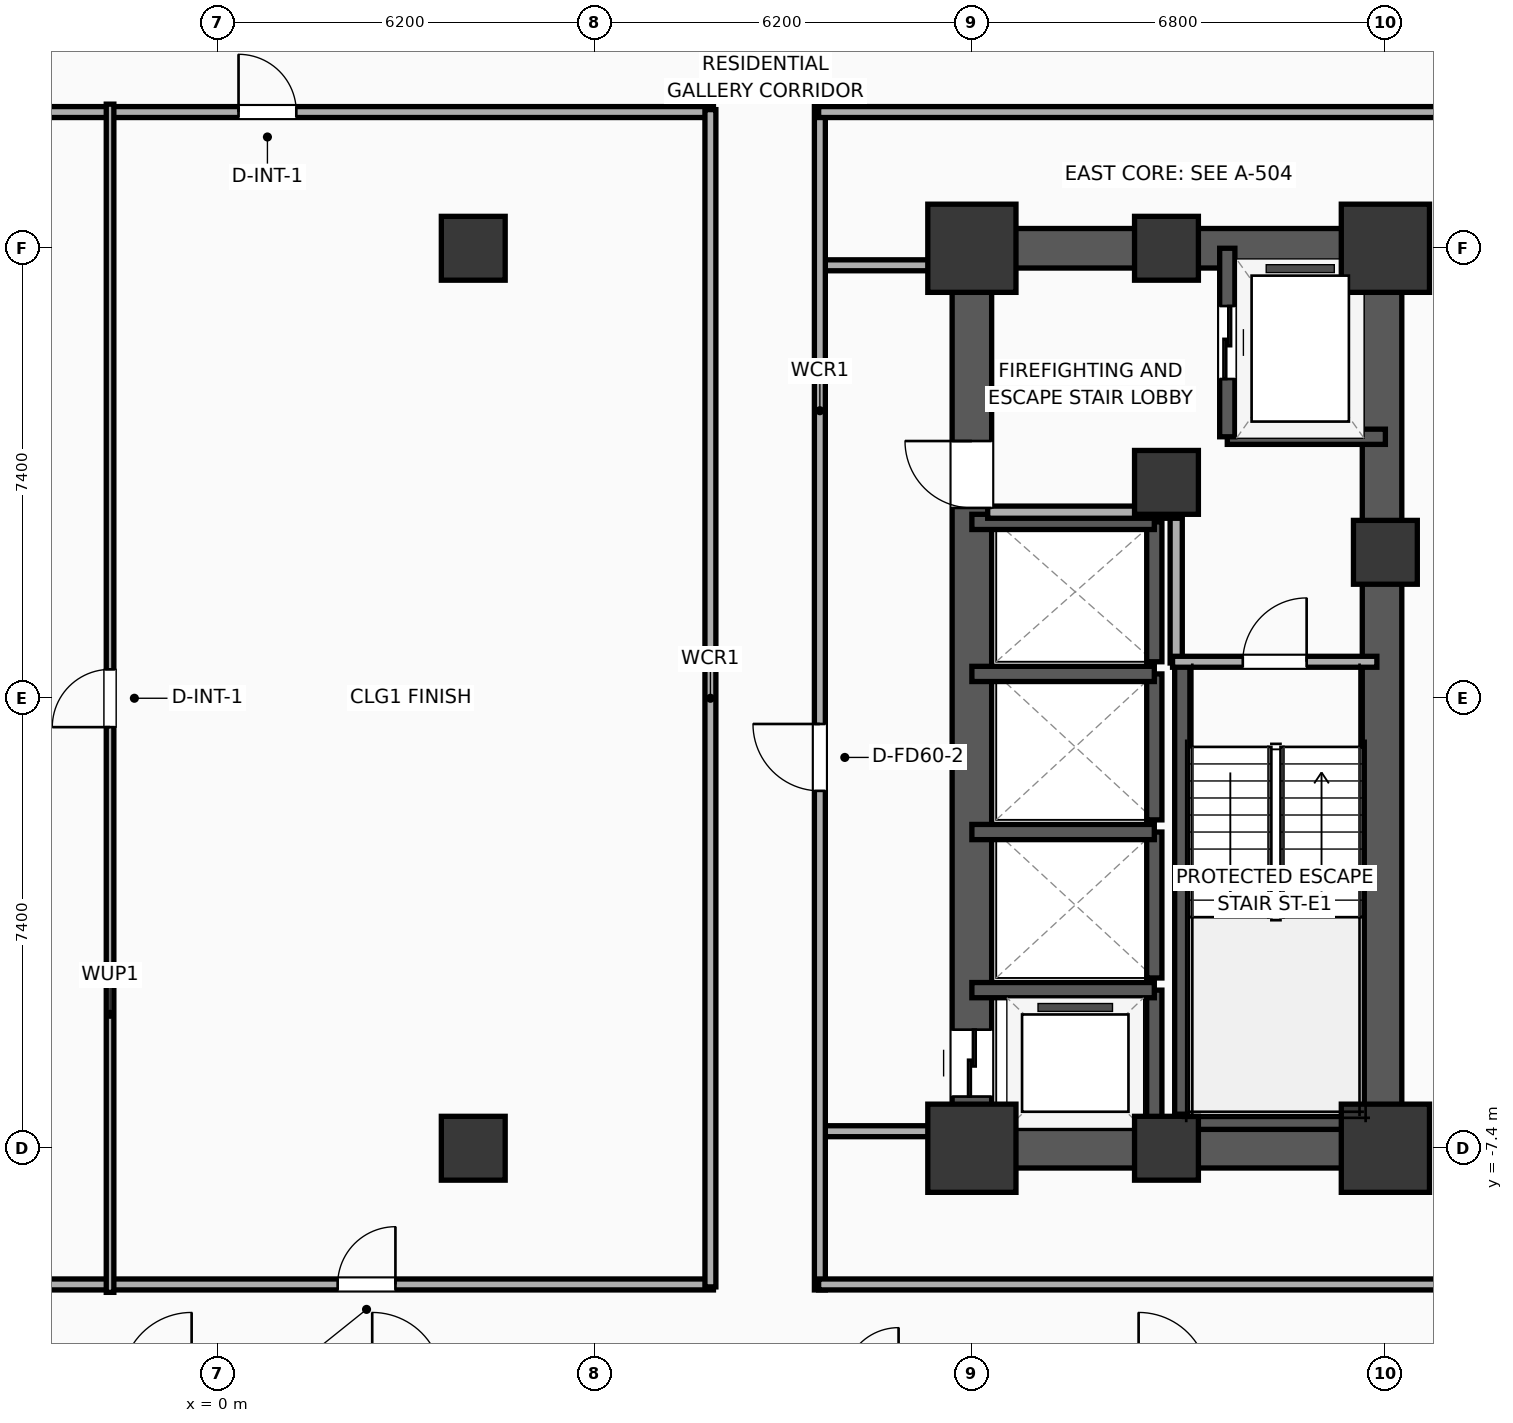
"""IFC4 building model, lengths in metres.
Left out: names, types, materials, properties, quantities, classifications, styles, units other than length and angle.
Written with IfcOpenShell. Run it as: python <this file> out.ifc"""

import sys

from ifc_helpers import new_model, si_unit, direction, frame, frame_2d, origin, origin_2d, place, context, subcontext, project, spatial, rectangle, extrude, element, fill, save


model = new_model("IFC4")
c1 = context("Model", 3, precision=1e-05, world=origin(), true_north=direction((0.0, 1.0)))
c2 = subcontext(c1, "Body", "Model", "MODEL_VIEW")
j1 = project(units=[si_unit("LENGTHUNIT", "METRE"), si_unit("PLANEANGLEUNIT", "RADIAN")], contexts=[c1])
p1 = place(None, origin())
s1 = spatial("IfcSite", under=j1, at=p1, CompositionType="ELEMENT")
p2 = place(p1, origin())
s2 = spatial("IfcBuilding", under=s1, at=p2, CompositionType="ELEMENT")
p3 = place(p2, frame((0.0, 0.0, 76.7)))
s3 = spatial("IfcBuildingStorey", under=s2, at=p3, CompositionType="ELEMENT", Elevation=76.7)
p4 = place(p3, frame((12.4, -7.4, 0.0), z_axis=(0.0, 0.0, 1.0), x_axis=(1.0, 0.0, 0.0)))
e1 = element("IfcColumn", 1, at=p4, inside=s3, PredefinedType="COLUMN", context=c2, shape_type="SweptSolid", body=[
    extrude(rectangle(XDim=1.45, YDim=1.45, at=origin_2d()), origin(), (0.0, 0.0, 1.0), 3.9),
])
p5 = place(p3, frame((15.6, 3.55, 0.0), z_axis=(0.0, 0.0, 1.0), x_axis=(1.0, 0.0, 0.0)))
e2 = element("IfcColumn", 2, at=p5, inside=s3, PredefinedType="COLUMN", context=c2, shape_type="SweptSolid", body=[
    extrude(rectangle(XDim=1.05, YDim=1.05, at=origin_2d()), origin(), (0.0, 0.0, 1.0), 3.9),
])
p6 = place(p3, frame((12.4, 7.4, 0.0), z_axis=(0.0, 0.0, 1.0), x_axis=(1.0, 0.0, 0.0)))
e3 = element("IfcColumn", 3, at=p6, inside=s3, PredefinedType="COLUMN", context=c2, shape_type="SweptSolid", body=[
    extrude(rectangle(XDim=1.45, YDim=1.45, at=origin_2d()), origin(), (0.0, 0.0, 1.0), 3.9),
])
for number, where, z_axis, x_axis in (
    (4, (15.6, -7.4, 0.0), (0.0, 0.0, 1.0), (1.0, 0.0, 0.0)),
    (5, (15.6, 7.4, 0.0), (0.0, 0.0, 1.0), (1.0, 0.0, 0.0)),
):
    element("IfcColumn", number, at=place(p3, frame(where, z_axis=z_axis, x_axis=x_axis)), inside=s3, PredefinedType="COLUMN", context=c2, shape_type="SweptSolid", body=[
        extrude(rectangle(XDim=1.05, YDim=1.05, at=origin_2d()), origin(), (0.0, 0.0, 1.0), 3.9),
    ])
p7 = place(p3, frame((19.2, -7.4, 0.0), z_axis=(0.0, 0.0, 1.0), x_axis=(1.0, 0.0, 0.0)))
e6 = element("IfcColumn", 6, at=p7, inside=s3, PredefinedType="COLUMN", context=c2, shape_type="SweptSolid", body=[
    extrude(rectangle(XDim=1.45, YDim=1.45, at=origin_2d()), origin(), (0.0, 0.0, 1.0), 3.9),
])
p8 = place(p3, frame((19.2, 2.4, 0.0), z_axis=(0.0, 0.0, 1.0), x_axis=(1.0, 0.0, 0.0)))
e7 = element("IfcColumn", 7, at=p8, inside=s3, PredefinedType="COLUMN", context=c2, shape_type="SweptSolid", body=[
    extrude(rectangle(XDim=1.05, YDim=1.05, at=origin_2d()), origin(), (0.0, 0.0, 1.0), 3.9),
])
p9 = place(p3, frame((19.2, 7.4, 0.0), z_axis=(0.0, 0.0, 1.0), x_axis=(1.0, 0.0, 0.0)))
e8 = element("IfcColumn", 8, at=p9, inside=s3, PredefinedType="COLUMN", context=c2, shape_type="SweptSolid", body=[
    extrude(rectangle(XDim=1.45, YDim=1.45, at=origin_2d()), origin(), (0.0, 0.0, 1.0), 3.9),
])
for number, where, z_axis, x_axis in (
    (9, (12.075, -7.4, 0.0), (0.0, 0.0, 1.0), (1.0, 0.0, 0.0)),
    (10, (12.075, 7.4, 0.0), (0.0, 0.0, 1.0), (1.0, 0.0, 0.0)),
):
    element("IfcWall", number, at=place(p3, frame(where, z_axis=z_axis, x_axis=x_axis)), inside=s3, PredefinedType="SHEAR", context=c2, shape_type="SweptSolid", body=[
        extrude(rectangle(XDim=7.45, YDim=0.65, at=frame_2d((3.725, 0.0))), origin(), (0.0, 0.0, 1.0), 3.6),
    ])
p10 = place(p3, frame((12.4, -7.4, 0.0), z_axis=(0.0, 0.0, 1.0), x_axis=(0.0, 1.0, 0.0)))
e11 = element("IfcWall", 11, at=p10, inside=s3, PredefinedType="SHEAR", context=c2, shape_type="SweptSolid", body=[
    extrude(rectangle(XDim=14.8, YDim=0.65, at=frame_2d((7.4, 0.0))), origin(), (0.0, 0.0, 1.0), 3.6),
])
p11 = place(p10, frame((0.85, 0.0, 0.0)))
e12 = element("IfcOpeningElement", 12, at=p11, cuts=e11, PredefinedType="OPENING", context=c2, shape_type="SweptSolid", body=[
    extrude(rectangle(XDim=1.1, YDim=2.05, at=frame_2d((0.55, 1.025))), frame((0.0, 0.335, 0.0), z_axis=(0.0, -1.0, 0.0), x_axis=(1.0, 0.0, 0.0)), (0.0, 0.0, 1.0), 0.67),
])
p12 = place(p10, frame((10.53, 0.0, 0.0)))
e13 = element("IfcOpeningElement", 13, at=p12, cuts=e11, PredefinedType="OPENING", context=c2, shape_type="SweptSolid", body=[
    extrude(rectangle(XDim=1.1, YDim=2.05, at=frame_2d((0.55, 1.025))), frame((0.0, 0.335, 0.0), z_axis=(0.0, -1.0, 0.0), x_axis=(1.0, 0.0, 0.0)), (0.0, 0.0, 1.0), 0.67),
])
p13 = place(p3, frame((19.145, -7.4, 0.0), z_axis=(0.0, 0.0, 1.0), x_axis=(0.0, 1.0, 0.0)))
e14 = element("IfcWall", 14, at=p13, inside=s3, PredefinedType="SHEAR", context=c2, shape_type="SweptSolid", body=[
    extrude(rectangle(XDim=14.8, YDim=0.65, at=frame_2d((7.4, 0.0))), origin(), (0.0, 0.0, 1.0), 3.6),
])
p14 = place(p3, frame((15.86, -7.085, 0.0), z_axis=(0.0, 0.0, 1.0), x_axis=(0.0, 1.0, 0.0)))
e15 = element("IfcWall", 15, at=p14, inside=s3, PredefinedType="SOLIDWALL", context=c2, shape_type="SweptSolid", body=[
    extrude(rectangle(XDim=7.685, YDim=0.25, at=frame_2d((3.843, 0.0))), origin(), (0.0, 0.0, 1.0), 3.6),
])
p15 = place(p3, frame((15.74, -6.965, 0.0), z_axis=(0.0, 0.0, 1.0), x_axis=(1.0, 0.0, 0.0)))
e16 = element("IfcWall", 16, at=p15, inside=s3, PredefinedType="SOLIDWALL", context=c2, shape_type="SweptSolid", body=[
    extrude(rectangle(XDim=3.46, YDim=0.25, at=frame_2d((1.73, 0.0))), origin(), (0.0, 0.0, 1.0), 3.6),
])
for number, where, z_axis, x_axis in (
    (17, (4.2, -7.4, 0.0), (0.0, 0.0, 1.0), (1.0, 0.0, 0.0)),
    (18, (4.2, 7.4, 0.0), (0.0, 0.0, 1.0), (1.0, 0.0, 0.0)),
):
    element("IfcColumn", number, at=place(p3, frame(where, z_axis=z_axis, x_axis=x_axis)), inside=s3, PredefinedType="COLUMN", context=c2, shape_type="SweptSolid", body=[
        extrude(rectangle(XDim=1.05, YDim=1.05, at=origin_2d()), origin(), (0.0, 0.0, 1.0), 3.9),
    ])
p16 = place(p3, frame((16.6, 4.3, 0.0), z_axis=(0.0, 0.0, 1.0), x_axis=(1.0, 0.0, 0.0)))
e19 = element("IfcWall", 19, at=p16, inside=s3, PredefinedType="SOLIDWALL", context=c2, shape_type="SweptSolid", body=[
    extrude(rectangle(XDim=2.6, YDim=0.25, at=frame_2d((1.3, 0.0))), origin(), (0.0, 0.0, 1.0), 3.6),
])
p17 = place(p3, frame((16.6, 7.4, 0.0), z_axis=(0.0, 0.0, 1.0), x_axis=(0.0, -1.0, 0.0)))
e20 = element("IfcWall", 20, at=p17, inside=s3, PredefinedType="SOLIDWALL", context=c2, shape_type="SweptSolid", body=[
    extrude(rectangle(XDim=3.1, YDim=0.25, at=frame_2d((1.55, 0.0))), origin(), (0.0, 0.0, 1.0), 3.6),
])
p18 = place(p17, frame((0.95, 0.0, 0.0)))
e21 = element("IfcOpeningElement", 21, at=p18, cuts=e20, PredefinedType="OPENING", context=c2, shape_type="SweptSolid", body=[
    extrude(rectangle(XDim=1.2, YDim=2.05, at=frame_2d((0.6, 1.025))), frame((0.0, 0.135, 0.0), z_axis=(0.0, -1.0, 0.0), x_axis=(1.0, 0.0, 0.0)), (0.0, 0.0, 1.0), 0.27),
])
p19 = place(p3, frame((15.4, -7.4, 0.0), z_axis=(0.0, 0.0, 1.0), x_axis=(0.0, 1.0, 0.0)))
e22 = element("IfcWall", 22, at=p19, inside=s3, PredefinedType="SOLIDWALL", context=c2, shape_type="SweptSolid", body=[
    extrude(rectangle(XDim=2.6, YDim=0.25, at=frame_2d((1.3, 0.0))), origin(), (0.0, 0.0, 1.0), 3.6),
])
p20 = place(p3, frame((15.4, -4.8, 0.0), z_axis=(0.0, 0.0, 1.0), x_axis=(-1.0, 0.0, 0.0)))
e23 = element("IfcWall", 23, at=p20, inside=s3, PredefinedType="SOLIDWALL", context=c2, shape_type="SweptSolid", body=[
    extrude(rectangle(XDim=3.0, YDim=0.25, at=frame_2d((1.5, 0.0))), origin(), (0.0, 0.0, 1.0), 3.6),
])
p21 = place(p3, frame((15.4, -4.6, 0.0), z_axis=(0.0, 0.0, 1.0), x_axis=(0.0, 1.0, 0.0)))
e24 = element("IfcWall", 24, at=p21, inside=s3, PredefinedType="SOLIDWALL", context=c2, shape_type="SweptSolid", body=[
    extrude(rectangle(XDim=2.4, YDim=0.25, at=frame_2d((1.2, 0.0))), origin(), (0.0, 0.0, 1.0), 3.6),
])
p22 = place(p3, frame((15.4, -2.2, 0.0), z_axis=(0.0, 0.0, 1.0), x_axis=(-1.0, 0.0, 0.0)))
e25 = element("IfcWall", 25, at=p22, inside=s3, PredefinedType="SOLIDWALL", context=c2, shape_type="SweptSolid", body=[
    extrude(rectangle(XDim=3.0, YDim=0.25, at=frame_2d((1.5, 0.0))), origin(), (0.0, 0.0, 1.0), 3.6),
])
p23 = place(p3, frame((15.4, -2.0, 0.0), z_axis=(0.0, 0.0, 1.0), x_axis=(0.0, 1.0, 0.0)))
e26 = element("IfcWall", 26, at=p23, inside=s3, PredefinedType="SOLIDWALL", context=c2, shape_type="SweptSolid", body=[
    extrude(rectangle(XDim=2.4, YDim=0.25, at=frame_2d((1.2, 0.0))), origin(), (0.0, 0.0, 1.0), 3.6),
])
p24 = place(p3, frame((15.4, 0.4, 0.0), z_axis=(0.0, 0.0, 1.0), x_axis=(-1.0, 0.0, 0.0)))
e27 = element("IfcWall", 27, at=p24, inside=s3, PredefinedType="SOLIDWALL", context=c2, shape_type="SweptSolid", body=[
    extrude(rectangle(XDim=3.0, YDim=0.25, at=frame_2d((1.5, 0.0))), origin(), (0.0, 0.0, 1.0), 3.6),
])
p25 = place(p3, frame((15.4, 0.6, 0.0), z_axis=(0.0, 0.0, 1.0), x_axis=(0.0, 1.0, 0.0)))
e28 = element("IfcWall", 28, at=p25, inside=s3, PredefinedType="SOLIDWALL", context=c2, shape_type="SweptSolid", body=[
    extrude(rectangle(XDim=2.3, YDim=0.25, at=frame_2d((1.15, 0.0))), origin(), (0.0, 0.0, 1.0), 3.6),
])
p26 = place(p3, frame((15.4, 2.9, 0.0), z_axis=(0.0, 0.0, 1.0), x_axis=(-1.0, 0.0, 0.0)))
e29 = element("IfcWall", 29, at=p26, inside=s3, PredefinedType="SOLIDWALL", context=c2, shape_type="SweptSolid", body=[
    extrude(rectangle(XDim=3.0, YDim=0.25, at=frame_2d((1.5, 0.0))), origin(), (0.0, 0.0, 1.0), 3.6),
])
p27 = place(p3, frame((15.76, 0.58, 0.0), z_axis=(0.0, 0.0, 1.0), x_axis=(0.0, 1.0, 0.0)))
e30 = element("IfcWall", 30, at=p27, inside=s3, PredefinedType="PARTITIONING", context=c2, shape_type="SweptSolid", body=[
    extrude(rectangle(XDim=2.52, YDim=0.2, at=frame_2d((1.26, 0.0))), origin(), (0.0, 0.0, 1.0), 3.6),
])
p28 = place(p3, frame((12.66, 3.06, 0.0), z_axis=(0.0, 0.0, 1.0), x_axis=(1.0, 0.0, 0.0)))
e31 = element("IfcWall", 31, at=p28, inside=s3, PredefinedType="PARTITIONING", context=c2, shape_type="SweptSolid", body=[
    extrude(rectangle(XDim=3.16, YDim=0.2, at=frame_2d((1.58, 0.0))), origin(), (0.0, 0.0, 1.0), 3.6),
])
p29 = place(p3, frame((15.7, 0.6, 0.0), z_axis=(0.0, 0.0, 1.0), x_axis=(1.0, 0.0, 0.0)))
e32 = element("IfcWall", 32, at=p29, inside=s3, PredefinedType="PARTITIONING", context=c2, shape_type="SweptSolid", body=[
    extrude(rectangle(XDim=3.36, YDim=0.18, at=frame_2d((1.68, 0.0))), origin(), (0.0, 0.0, 1.0), 3.6),
])
p30 = place(p29, frame((1.155, 0.0, 0.0)))
e33 = element("IfcOpeningElement", 33, at=p30, cuts=e32, PredefinedType="OPENING", context=c2, shape_type="SweptSolid", body=[
    extrude(rectangle(XDim=1.05, YDim=2.05, at=frame_2d((0.525, 1.025))), frame((0.0, 0.1, 0.0), z_axis=(0.0, -1.0, 0.0), x_axis=(1.0, 0.0, 0.0)), (0.0, 0.0, 1.0), 0.2),
])
for number, where, z_axis, x_axis in (
    (34, (9.88, 7.12, 0.0), (0.0, 0.0, 1.0), (1.0, 0.0, 0.0)),
    (35, (9.88, -7.12, 0.0), (0.0, 0.0, 1.0), (1.0, 0.0, 0.0)),
):
    element("IfcWall", number, at=place(p3, frame(where, z_axis=z_axis, x_axis=x_axis)), inside=s3, PredefinedType="PARTITIONING", context=c2, shape_type="SweptSolid", body=[
        extrude(rectangle(XDim=2.27, YDim=0.18, at=frame_2d((1.135, 0.0))), origin(), (0.0, 0.0, 1.0), 2.89),
    ])
p31 = place(p3, frame((9.9, -9.73, 0.0), z_axis=(0.0, 0.0, 1.0), x_axis=(0.0, 1.0, 0.0)))
e36 = element("IfcWall", 36, at=p31, inside=s3, PredefinedType="PARTITIONING", context=c2, shape_type="SweptSolid", body=[
    extrude(rectangle(XDim=19.46, YDim=0.18, at=frame_2d((9.73, 0.0))), origin(), (0.0, 0.0, 1.0), 3.6),
])
p32 = place(p31, frame((8.207, 0.0, 0.0)))
e37 = element("IfcOpeningElement", 37, at=p32, cuts=e36, PredefinedType="OPENING", context=c2, shape_type="SweptSolid", body=[
    extrude(rectangle(XDim=1.1, YDim=2.05, at=frame_2d((0.55, 1.025))), frame((0.0, 0.1, 0.0), z_axis=(0.0, -1.0, 0.0), x_axis=(1.0, 0.0, 0.0)), (0.0, 0.0, 1.0), 0.2),
])
p33 = place(p3, frame((9.88, 9.64, 0.0), z_axis=(0.0, 0.0, 1.0), x_axis=(1.0, 0.0, 0.0)))
e38 = element("IfcWall", 38, at=p33, inside=s3, PredefinedType="PARTITIONING", context=c2, shape_type="SweptSolid", body=[
    extrude(rectangle(XDim=16.33, YDim=0.18, at=frame_2d((8.165, 0.0))), origin(), (0.0, 0.0, 1.0), 3.6),
])
p34 = place(p33, frame((14.415, 0.0, 0.0)))
e39 = element("IfcOpeningElement", 39, at=p34, cuts=e38, PredefinedType="OPENING", context=c2, shape_type="SweptSolid", body=[
    extrude(rectangle(XDim=0.9, YDim=2.05, at=frame_2d((0.45, 1.025))), frame((0.0, 0.1, 0.0), z_axis=(0.0, -1.0, 0.0), x_axis=(1.0, 0.0, 0.0)), (0.0, 0.0, 1.0), 0.2),
])
p35 = place(p3, frame((9.88, -9.64, 0.0), z_axis=(0.0, 0.0, 1.0), x_axis=(1.0, 0.0, 0.0)))
e40 = element("IfcWall", 40, at=p35, inside=s3, PredefinedType="PARTITIONING", context=c2, shape_type="SweptSolid", body=[
    extrude(rectangle(XDim=16.33, YDim=0.18, at=frame_2d((8.165, 0.0))), origin(), (0.0, 0.0, 1.0), 3.6),
])
p36 = place(p3, frame((-8.15, 9.64, 0.0), z_axis=(0.0, 0.0, 1.0), x_axis=(1.0, 0.0, 0.0)))
e41 = element("IfcWall", 41, at=p36, inside=s3, PredefinedType="PARTITIONING", context=c2, shape_type="SweptSolid", body=[
    extrude(rectangle(XDim=16.3, YDim=0.18, at=frame_2d((8.15, 0.0))), origin(), (0.0, 0.0, 1.0), 3.6),
])
p37 = place(p36, frame((8.49, 0.0, 0.0)))
e42 = element("IfcOpeningElement", 42, at=p37, cuts=e41, PredefinedType="OPENING", context=c2, shape_type="SweptSolid", body=[
    extrude(rectangle(XDim=0.95, YDim=2.05, at=frame_2d((0.475, 1.025))), frame((0.0, 0.1, 0.0), z_axis=(0.0, -1.0, 0.0), x_axis=(1.0, 0.0, 0.0)), (0.0, 0.0, 1.0), 0.2),
])
p38 = place(p3, frame((-8.15, -9.64, 0.0), z_axis=(0.0, 0.0, 1.0), x_axis=(1.0, 0.0, 0.0)))
e43 = element("IfcWall", 43, at=p38, inside=s3, PredefinedType="PARTITIONING", context=c2, shape_type="SweptSolid", body=[
    extrude(rectangle(XDim=16.3, YDim=0.18, at=frame_2d((8.15, 0.0))), origin(), (0.0, 0.0, 1.0), 3.6),
])
p39 = place(p38, frame((1.13, 0.0, 0.0)))
e44 = element("IfcOpeningElement", 44, at=p39, cuts=e43, PredefinedType="OPENING", context=c2, shape_type="SweptSolid", body=[
    extrude(rectangle(XDim=1.0, YDim=2.05, at=frame_2d((0.5, 1.025))), frame((0.0, 0.1, 0.0), z_axis=(0.0, -1.0, 0.0), x_axis=(1.0, 0.0, 0.0)), (0.0, 0.0, 1.0), 0.2),
])
p40 = place(p38, frame((10.12, 0.0, 0.0)))
e45 = element("IfcOpeningElement", 45, at=p40, cuts=e43, PredefinedType="OPENING", context=c2, shape_type="SweptSolid", body=[
    extrude(rectangle(XDim=0.95, YDim=2.05, at=frame_2d((0.475, 1.025))), frame((0.0, 0.1, 0.0), z_axis=(0.0, -1.0, 0.0), x_axis=(1.0, 0.0, 0.0)), (0.0, 0.0, 1.0), 0.2),
])
p41 = place(p3, frame((8.1, -9.68, 0.0), z_axis=(0.0, 0.0, 1.0), x_axis=(0.0, 1.0, 0.0)))
e46 = element("IfcWall", 46, at=p41, inside=s3, PredefinedType="PARTITIONING", context=c2, shape_type="SweptSolid", body=[
    extrude(rectangle(XDim=19.36, YDim=0.18, at=frame_2d((9.68, 0.0))), origin(), (0.0, 0.0, 1.0), 3.6),
])
p42 = place(p3, frame((-1.773, -9.77, 0.0), z_axis=(0.0, 0.0, 1.0), x_axis=(0.0, 1.0, 0.0)))
e47 = element("IfcWall", 47, at=p42, inside=s3, PredefinedType="PARTITIONING", context=c2, shape_type="SweptSolid", body=[
    extrude(rectangle(XDim=19.54, YDim=0.125, at=frame_2d((9.77, 0.0))), origin(), (0.0, 0.0, 1.0), 3.6),
])
p43 = place(p42, frame((9.295, 0.0, 0.0)))
e48 = element("IfcOpeningElement", 48, at=p43, cuts=e47, PredefinedType="OPENING", context=c2, shape_type="SweptSolid", body=[
    extrude(rectangle(XDim=0.95, YDim=2.05, at=frame_2d((0.475, 1.025))), frame((0.0, 0.073, 0.0), z_axis=(0.0, -1.0, 0.0), x_axis=(1.0, 0.0, 0.0)), (0.0, 0.0, 1.0), 0.145),
])
p44 = place(p18, origin())
e49 = element("IfcDoor", 49, at=p44, inside=s3, OperationType="SLIDING_TO_LEFT", PredefinedType="DOOR", context=c2, shape_type="SweptSolid", body=[
    extrude(rectangle(XDim=1.2, YDim=2.05, at=frame_2d((0.6, 1.025))), frame((0.0, 0.025, 0.0), z_axis=(0.0, -1.0, 0.0), x_axis=(1.0, 0.0, 0.0)), (0.0, 0.0, 1.0), 0.05),
])
fill(e21, e49)
p45 = place(p11, origin())
e50 = element("IfcDoor", 50, at=p45, inside=s3, OperationType="SLIDING_TO_LEFT", PredefinedType="DOOR", context=c2, shape_type="SweptSolid", body=[
    extrude(rectangle(XDim=1.1, YDim=2.05, at=frame_2d((0.55, 1.025))), frame((0.0, 0.025, 0.0), z_axis=(0.0, -1.0, 0.0), x_axis=(1.0, 0.0, 0.0)), (0.0, 0.0, 1.0), 0.05),
])
fill(e12, e50)
p46 = place(p30, origin())
e51 = element("IfcDoor", 51, at=p46, inside=s3, OperationType="SINGLE_SWING_RIGHT", PredefinedType="DOOR", context=c2, shape_type="SweptSolid", body=[
    extrude(rectangle(XDim=1.05, YDim=2.05, at=frame_2d((0.525, 1.025))), frame((0.0, 0.025, 0.0), z_axis=(0.0, -1.0, 0.0), x_axis=(1.0, 0.0, 0.0)), (0.0, 0.0, 1.0), 0.05),
])
fill(e33, e51)
p47 = place(p32, origin())
e52 = element("IfcDoor", 52, at=p47, inside=s3, OperationType="SINGLE_SWING_RIGHT", PredefinedType="DOOR", context=c2, shape_type="SweptSolid", body=[
    extrude(rectangle(XDim=1.1, YDim=2.05, at=frame_2d((0.55, 1.025))), frame((0.0, 0.025, 0.0), z_axis=(0.0, -1.0, 0.0), x_axis=(1.0, 0.0, 0.0)), (0.0, 0.0, 1.0), 0.05),
])
fill(e37, e52)
p48 = place(p37, origin())
e53 = element("IfcDoor", 53, at=p48, inside=s3, OperationType="SINGLE_SWING_LEFT", PredefinedType="DOOR", context=c2, shape_type="SweptSolid", body=[
    extrude(rectangle(XDim=0.95, YDim=2.05, at=frame_2d((0.475, 1.025))), frame((0.0, 0.025, 0.0), z_axis=(0.0, -1.0, 0.0), x_axis=(1.0, 0.0, 0.0)), (0.0, 0.0, 1.0), 0.05),
])
fill(e42, e53)
p49 = place(p40, origin())
e54 = element("IfcDoor", 54, at=p49, inside=s3, OperationType="SINGLE_SWING_RIGHT", PredefinedType="DOOR", context=c2, shape_type="SweptSolid", body=[
    extrude(rectangle(XDim=0.95, YDim=2.05, at=frame_2d((0.475, 1.025))), frame((0.0, 0.025, 0.0), z_axis=(0.0, -1.0, 0.0), x_axis=(1.0, 0.0, 0.0)), (0.0, 0.0, 1.0), 0.05),
])
fill(e45, e54)
p50 = place(p43, origin())
e55 = element("IfcDoor", 55, at=p50, inside=s3, OperationType="SINGLE_SWING_LEFT", PredefinedType="DOOR", context=c2, shape_type="SweptSolid", body=[
    extrude(rectangle(XDim=0.95, YDim=2.05, at=frame_2d((0.475, 1.025))), frame((0.0, 0.025, 0.0), z_axis=(0.0, -1.0, 0.0), x_axis=(1.0, 0.0, 0.0)), (0.0, 0.0, 1.0), 0.05),
])
fill(e48, e55)
p51 = place(p12, origin())
e56 = element("IfcDoor", 56, at=p51, inside=s3, OperationType="SINGLE_SWING_RIGHT", PredefinedType="DOOR", context=c2, shape_type="SweptSolid", body=[
    extrude(rectangle(XDim=1.1, YDim=2.05, at=frame_2d((0.55, 1.025))), frame((0.0, 0.025, 0.0), z_axis=(0.0, -1.0, 0.0), x_axis=(1.0, 0.0, 0.0)), (0.0, 0.0, 1.0), 0.05),
])
fill(e13, e56)
save(model, sys.argv[1])
